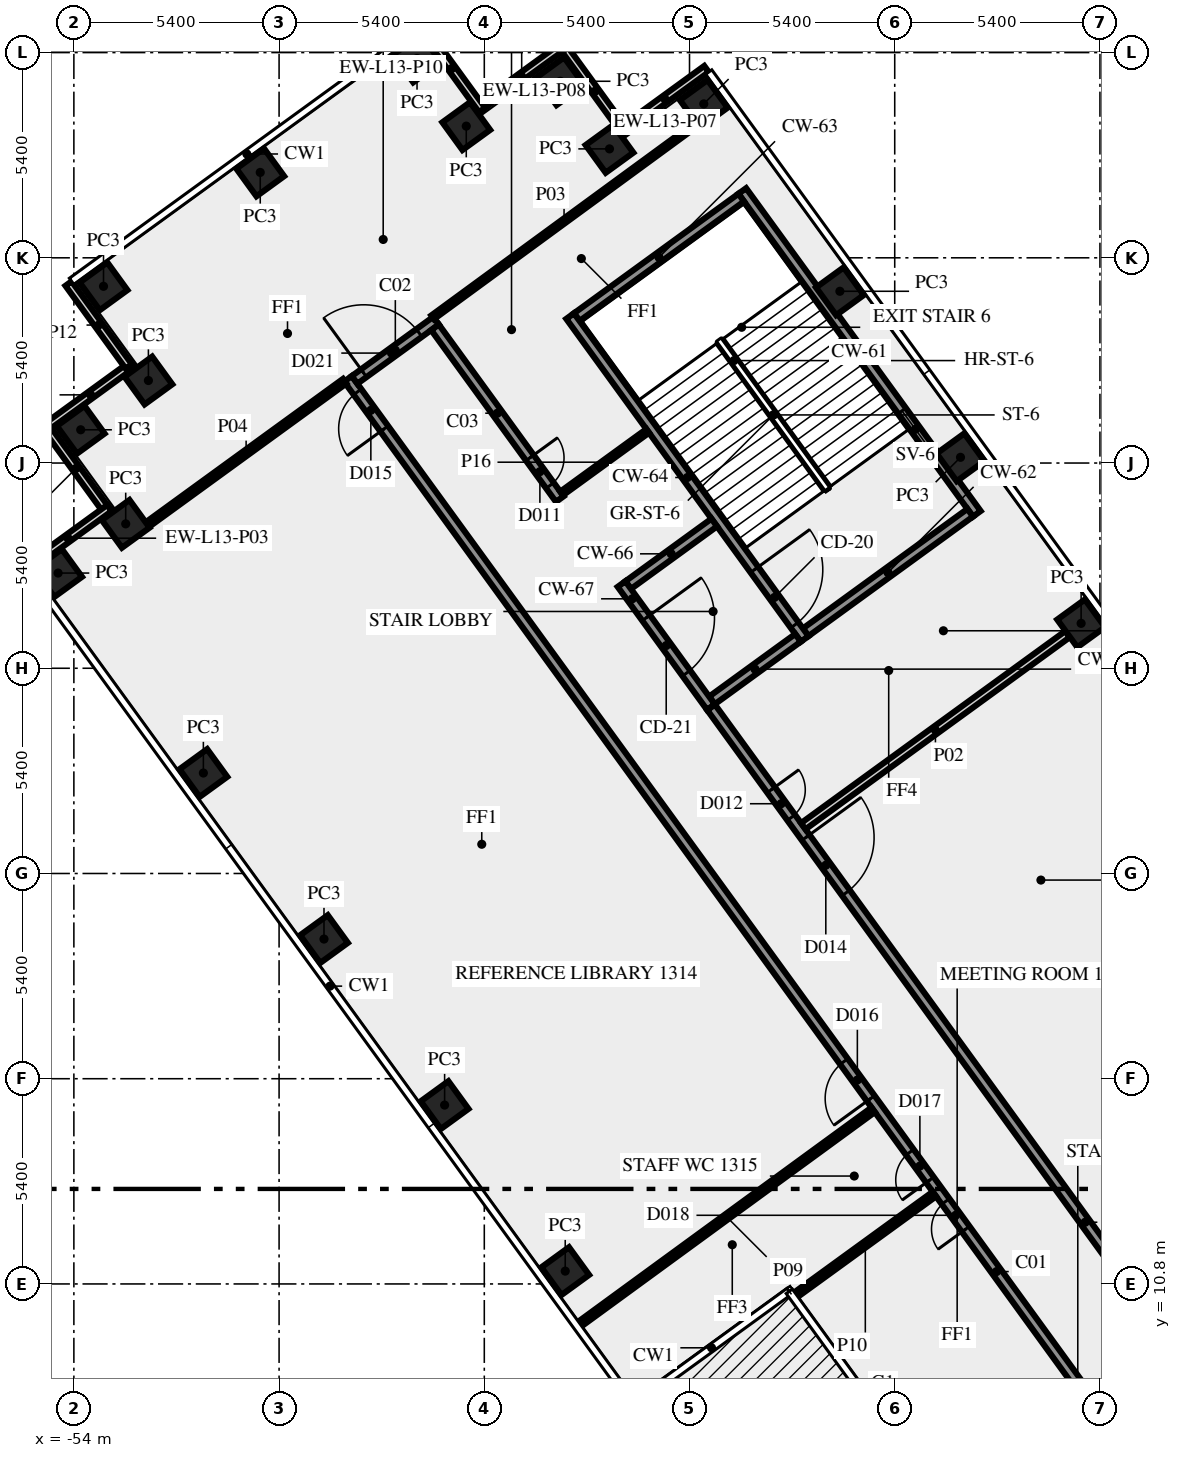
"""IFC4 building model, lengths in metres.
Left out: names, types, materials, properties, quantities, classifications, styles, units other than length and angle.
Written with IfcOpenShell. Run it as: python <this file> out.ifc"""

import sys

from ifc_helpers import new_model, si_unit, direction, frame, frame_2d, origin, origin_2d, place, context, subcontext, project, spatial, rectangle, extrude, element, fill, save


model = new_model("IFC4")
c1 = context("Model", 3, precision=1e-05, world=origin(), true_north=direction((0.0, 1.0)))
c2 = subcontext(c1, "Body", "Model", "MODEL_VIEW")
j1 = project(units=[si_unit("LENGTHUNIT", "METRE"), si_unit("PLANEANGLEUNIT", "RADIAN")], contexts=[c1])
p1 = place(None, origin())
s1 = spatial("IfcSite", under=j1, at=p1, CompositionType="ELEMENT")
p2 = place(p1, origin())
s2 = spatial("IfcBuilding", under=s1, at=p2, CompositionType="ELEMENT")
p3 = place(p2, frame((0.0, 0.0, 59.0)))
s3 = spatial("IfcBuildingStorey", under=s2, at=p3, CompositionType="ELEMENT", Elevation=59.0)
for number, where, z_axis, x_axis in (
    (1, (-27.495, 28.181, 0.0), (0.0, 0.0, 1.0), (-0.588, 0.809, 0.0)),
    (2, (-30.669, 32.55, 0.0), (0.0, 0.0, 1.0), (-0.588, 0.809, 0.0)),
    (3, (-33.843, 36.919, 0.0), (0.0, 0.0, 1.0), (-0.588, 0.809, 0.0)),
    (4, (-37.425, 41.85, 0.0), (0.0, 0.0, 1.0), (-0.588, 0.809, 0.0)),
    (5, (-39.906, 40.666, 0.0), (0.0, 0.0, 1.0), (-0.588, 0.809, 0.0)),
    (6, (-41.2, 42.445, 0.0), (0.0, 0.0, 1.0), (-0.588, 0.809, 0.0)),
    (7, (-43.675, 41.265, 0.0), (0.0, 0.0, 1.0), (-0.809, -0.588, 0.0)),
    (8, (-44.97, 43.045, 0.0), (0.0, 0.0, 1.0), (-0.809, -0.588, 0.0)),
    (9, (-49.096, 40.047, 0.0), (0.0, 0.0, 1.0), (-0.809, -0.588, 0.0)),
    (10, (-53.22, 37.05, 0.0), (0.0, 0.0, 1.0), (0.588, -0.809, 0.0)),
    (11, (-52.039, 34.571, 0.0), (0.0, 0.0, 1.0), (-0.809, -0.588, 0.0)),
    (12, (-53.82, 33.275, 0.0), (0.0, 0.0, 1.0), (0.588, -0.809, 0.0)),
    (13, (-52.636, 30.8, 0.0), (0.0, 0.0, 1.0), (-0.809, -0.588, 0.0)),
    (14, (-54.415, 29.505, 0.0), (0.0, 0.0, 1.0), (0.588, -0.809, 0.0)),
    (15, (-50.592, 24.243, 0.0), (0.0, 0.0, 1.0), (0.588, -0.809, 0.0)),
    (16, (-47.418, 19.875, 0.0), (0.0, 0.0, 1.0), (0.588, -0.809, 0.0)),
    (17, (-44.244, 15.506, 0.0), (0.0, 0.0, 1.0), (0.588, -0.809, 0.0)),
    (18, (-41.07, 11.137, 0.0), (0.0, 0.0, 1.0), (0.588, -0.809, 0.0)),
):
    element("IfcColumn", number, at=place(p3, frame(where, z_axis=z_axis, x_axis=x_axis)), inside=s3, PredefinedType="COLUMN", context=c2, shape_type="SweptSolid", body=[
        extrude(rectangle(XDim=0.9, YDim=0.9, at=origin_2d()), origin(), (0.0, 0.0, 1.0), 3.65),
    ])
p4 = place(p3, frame((-52.465, 34.987, 0.0), z_axis=(0.0, 0.0, 1.0), x_axis=(-0.809033161865, -0.587762999008, 0.0)))
e19 = element("IfcWall", 19, at=p4, inside=s3, PredefinedType="SOLIDWALL", context=c2, shape_type="SweptSolid", body=[
    extrude(rectangle(XDim=2.7, YDim=0.2, at=frame_2d((1.35, 0.0))), origin(), (0.0, 0.0, 1.0), 3.65),
])
p5 = place(p3, frame((-54.738, 33.351, 0.0), z_axis=(0.0, 0.0, 1.0), x_axis=(0.587779184282, -0.809021403008, 0.0)))
e20 = element("IfcWall", 20, at=p5, inside=s3, PredefinedType="SOLIDWALL", context=c2, shape_type="SweptSolid", body=[
    extrude(rectangle(XDim=2.7, YDim=0.2, at=frame_2d((1.35, 0.0))), origin(), (0.0, 0.0, 1.0), 3.65),
])
for number, where, z_axis, x_axis in (
    (21, (-53.063, 31.216, 0.0), (0.0, 0.0, 1.0), (-0.809, -0.588, 0.0)),
    (22, (-37.353, 42.768, 0.0), (0.0, 0.0, 1.0), (-0.809, -0.588, 0.0)),
):
    element("IfcWall", number, at=place(p3, frame(where, z_axis=z_axis, x_axis=x_axis)), inside=s3, PredefinedType="SOLIDWALL", context=c2, shape_type="SweptSolid", body=[
        extrude(rectangle(XDim=2.7, YDim=0.2, at=frame_2d((1.35, 0.0))), origin(), (0.0, 0.0, 1.0), 3.65),
    ])
p6 = place(p3, frame((-39.488, 41.094, 0.0), z_axis=(0.0, 0.0, 1.0), x_axis=(-0.587806000234, 0.809001919707, 0.0)))
e23 = element("IfcWall", 23, at=p6, inside=s3, PredefinedType="SOLIDWALL", context=c2, shape_type="SweptSolid", body=[
    extrude(rectangle(XDim=2.7, YDim=0.2, at=frame_2d((1.35, 0.0))), origin(), (0.0, 0.0, 1.0), 3.65),
])
for number, where, z_axis, x_axis in (
    (24, (-41.124, 43.366, 0.0), (0.0, 0.0, 1.0), (-0.809, -0.588, 0.0)),
    (25, (-43.259, 41.691, 0.0), (0.0, 0.0, 1.0), (-0.588, 0.809, 0.0)),
    (26, (-54.14, 37.123, 0.0), (0.0, 0.0, 1.0), (0.588, -0.809, 0.0)),
):
    element("IfcWall", number, at=place(p3, frame(where, z_axis=z_axis, x_axis=x_axis)), inside=s3, PredefinedType="SOLIDWALL", context=c2, shape_type="SweptSolid", body=[
        extrude(rectangle(XDim=2.7, YDim=0.2, at=frame_2d((1.35, 0.0))), origin(), (0.0, 0.0, 1.0), 3.65),
    ])
p7 = place(p3, frame((-30.24, 31.064, 0.0), z_axis=(0.0, 0.0, 1.0), x_axis=(-0.587795589702, 0.809009483706, 0.0)))
e27 = element("IfcWall", 27, at=p7, inside=s3, PredefinedType="SHEAR", context=c2, shape_type="SweptSolid", body=[
    extrude(rectangle(XDim=10.5, YDim=0.25, at=frame_2d((5.25, 0.0))), origin(), (0.0, 0.0, 1.0), 3.65),
])
p8 = place(p7, frame((2.15, 0.0, 1.0)))
e28 = element("IfcOpeningElement", 28, at=p8, cuts=e27, PredefinedType="OPENING", context=c2, shape_type="SweptSolid", body=[
    extrude(rectangle(XDim=1.2, YDim=1.2, at=frame_2d((0.6, 0.6))), frame((0.0, 0.135, 0.0), z_axis=(0.0, -1.0, 0.0), x_axis=(1.0, 0.0, 0.0)), (0.0, 0.0, 1.0), 0.27),
])
p9 = place(p3, frame((-30.414, 31.092, 0.0), z_axis=(0.0, 0.0, 1.0), x_axis=(-0.8089984606, -0.587810760999, 0.0)))
e29 = element("IfcWall", 29, at=p9, inside=s3, PredefinedType="SHEAR", context=c2, shape_type="SweptSolid", body=[
    extrude(rectangle(XDim=5.35, YDim=0.25, at=frame_2d((2.675, 0.0))), origin(), (0.0, 0.0, 1.0), 3.65),
])
p10 = place(p3, frame((-36.439, 39.384, 0.0), z_axis=(0.0, 0.0, 1.0), x_axis=(-0.809020161303, -0.587780893365, 0.0)))
e30 = element("IfcWall", 30, at=p10, inside=s3, PredefinedType="SHEAR", context=c2, shape_type="SweptSolid", body=[
    extrude(rectangle(XDim=5.35, YDim=0.25, at=frame_2d((2.675, 0.0))), origin(), (0.0, 0.0, 1.0), 3.65),
])
p11 = place(p3, frame((-40.942, 36.267, 0.0), z_axis=(0.0, 0.0, 1.0), x_axis=(0.587795589702, -0.809009483706, 0.0)))
e31 = element("IfcWall", 31, at=p11, inside=s3, PredefinedType="SHEAR", context=c2, shape_type="SweptSolid", body=[
    extrude(rectangle(XDim=10.5, YDim=0.25, at=frame_2d((5.25, 0.0))), origin(), (0.0, 0.0, 1.0), 3.65),
])
p12 = place(p11, frame((8.25, 0.0, 0.0)))
e32 = element("IfcOpeningElement", 32, at=p12, cuts=e31, PredefinedType="OPENING", context=c2, shape_type="SweptSolid", body=[
    extrude(rectangle(XDim=1.8, YDim=2.1, at=frame_2d((0.9, 1.05))), frame((0.0, 0.135, 0.0), z_axis=(0.0, -1.0, 0.0), x_axis=(1.0, 0.0, 0.0)), (0.0, 0.0, 1.0), 0.27),
])
for number, where, z_axis, x_axis in (
    (33, (-34.945, 27.8, 0.0), (0.0, 0.0, 1.0), (-0.809, -0.588, 0.0)),
    (34, (-37.149, 30.834, 0.0), (0.0, 0.0, 1.0), (-0.809, -0.588, 0.0)),
):
    element("IfcWall", number, at=place(p3, frame(where, z_axis=z_axis, x_axis=x_axis)), inside=s3, PredefinedType="SHEAR", context=c2, shape_type="SweptSolid", body=[
        extrude(rectangle(XDim=2.8, YDim=0.25, at=frame_2d((1.4, 0.0))), origin(), (0.0, 0.0, 1.0), 3.65),
    ])
p13 = place(p3, frame((-39.589, 29.216, 0.0), z_axis=(0.0, 0.0, 1.0), x_axis=(0.587772420479, -0.809026317077, 0.0)))
e35 = element("IfcWall", 35, at=p13, inside=s3, PredefinedType="SHEAR", context=c2, shape_type="SweptSolid", body=[
    extrude(rectangle(XDim=4.0, YDim=0.25, at=frame_2d((2.0, 0.0))), origin(), (0.0, 0.0, 1.0), 3.65),
])
p14 = place(p13, frame((1.1, 0.0, 0.0)))
e36 = element("IfcOpeningElement", 36, at=p14, cuts=e35, PredefinedType="OPENING", context=c2, shape_type="SweptSolid", body=[
    extrude(rectangle(XDim=1.8, YDim=2.1, at=frame_2d((0.9, 1.05))), frame((0.0, 0.135, 0.0), z_axis=(0.0, -1.0, 0.0), x_axis=(1.0, 0.0, 0.0)), (0.0, 0.0, 1.0), 0.27),
])
p15 = place(p3, frame((-20.531, -1.523, 0.0), z_axis=(0.0, 0.0, 1.0), x_axis=(-0.587784593204, 0.809017473231, 0.0)))
e37 = element("IfcWall", 37, at=p15, inside=s3, PredefinedType="SOLIDWALL", context=c2, shape_type="SweptSolid", body=[
    extrude(rectangle(XDim=44.67, YDim=0.25, at=frame_2d((22.335, 0.0))), origin(), (0.0, 0.0, 1.0), 3.65),
])
p16 = place(p15, frame((43.046, 0.0, 0.0)))
e38 = element("IfcOpeningElement", 38, at=p16, cuts=e37, PredefinedType="OPENING", context=c2, shape_type="SweptSolid", body=[
    extrude(rectangle(XDim=1.2, YDim=2.1, at=frame_2d((0.6, 1.05))), frame((0.0, 0.135, 0.0), z_axis=(0.0, -1.0, 0.0), x_axis=(1.0, 0.0, 0.0)), (0.0, 0.0, 1.0), 0.27),
])
p17 = place(p15, frame((21.266, 0.0, 0.0)))
e39 = element("IfcOpeningElement", 39, at=p17, cuts=e37, PredefinedType="OPENING", context=c2, shape_type="SweptSolid", body=[
    extrude(rectangle(XDim=1.2, YDim=2.1, at=frame_2d((0.6, 1.05))), frame((0.0, 0.135, 0.0), z_axis=(0.0, -1.0, 0.0), x_axis=(1.0, 0.0, 0.0)), (0.0, 0.0, 1.0), 0.27),
])
p18 = place(p15, frame((17.015, 0.0, 0.0)))
e40 = element("IfcOpeningElement", 40, at=p18, cuts=e37, PredefinedType="OPENING", context=c2, shape_type="SweptSolid", body=[
    extrude(rectangle(XDim=0.9, YDim=2.1, at=frame_2d((0.45, 1.05))), frame((0.0, 0.135, 0.0), z_axis=(0.0, -1.0, 0.0), x_axis=(1.0, 0.0, 0.0)), (0.0, 0.0, 1.0), 0.27),
])
p19 = place(p15, frame((0.533, 0.0, 0.0)))
e41 = element("IfcOpeningElement", 41, at=p19, cuts=e37, PredefinedType="OPENING", context=c2, shape_type="SweptSolid", body=[
    extrude(rectangle(XDim=0.9, YDim=2.1, at=frame_2d((0.45, 1.05))), frame((0.0, 0.135, 0.0), z_axis=(0.0, -1.0, 0.0), x_axis=(1.0, 0.0, 0.0)), (0.0, 0.0, 1.0), 0.27),
])
p20 = place(p15, frame((18.616, 0.0, 0.0)))
e42 = element("IfcOpeningElement", 42, at=p20, cuts=e37, PredefinedType="OPENING", context=c2, shape_type="SweptSolid", body=[
    extrude(rectangle(XDim=0.9, YDim=2.1, at=frame_2d((0.45, 1.05))), frame((0.0, 0.135, 0.0), z_axis=(0.0, -1.0, 0.0), x_axis=(1.0, 0.0, 0.0)), (0.0, 0.0, 1.0), 0.27),
])
p21 = place(p15, frame((7.816, 0.0, 0.0)))
e43 = element("IfcOpeningElement", 43, at=p21, cuts=e37, PredefinedType="OPENING", context=c2, shape_type="SweptSolid", body=[
    extrude(rectangle(XDim=0.9, YDim=2.1, at=frame_2d((0.45, 1.05))), frame((0.0, 0.135, 0.0), z_axis=(0.0, -1.0, 0.0), x_axis=(1.0, 0.0, 0.0)), (0.0, 0.0, 1.0), 0.27),
])
p22 = place(p3, frame((-46.613, 34.588, 0.0), z_axis=(0.0, 0.0, 1.0), x_axis=(0.808994936898, 0.587815610607, 0.0)))
e44 = element("IfcWall", 44, at=p22, inside=s3, PredefinedType="SOLIDWALL", context=c2, shape_type="SweptSolid", body=[
    extrude(rectangle(XDim=2.65, YDim=0.25, at=frame_2d((1.325, 0.0))), origin(), (0.0, 0.0, 1.0), 3.65),
])
p23 = place(p22, frame((0.299, 0.0, 0.0)))
e45 = element("IfcOpeningElement", 45, at=p23, cuts=e44, PredefinedType="OPENING", context=c2, shape_type="SweptSolid", body=[
    extrude(rectangle(XDim=1.8, YDim=2.1, at=frame_2d((0.9, 1.05))), frame((0.0, 0.135, 0.0), z_axis=(0.0, -1.0, 0.0), x_axis=(1.0, 0.0, 0.0)), (0.0, 0.0, 1.0), 0.27),
])
p24 = place(p3, frame((-44.497, 35.971, 0.0), z_axis=(0.0, 0.0, 1.0), x_axis=(0.587742866856, -0.809047787501, 0.0)))
e46 = element("IfcWall", 46, at=p24, inside=s3, PredefinedType="SOLIDWALL", context=c2, shape_type="SweptSolid", body=[
    extrude(rectangle(XDim=5.586, YDim=0.25, at=frame_2d((2.793, 0.0))), origin(), (0.0, 0.0, 1.0), 3.65),
])
p25 = place(p24, frame((4.245, 0.0, 0.0)))
e47 = element("IfcOpeningElement", 47, at=p25, cuts=e46, PredefinedType="OPENING", context=c2, shape_type="SweptSolid", body=[
    extrude(rectangle(XDim=0.9, YDim=2.1, at=frame_2d((0.45, 1.05))), frame((0.0, 0.135, 0.0), z_axis=(0.0, -1.0, 0.0), x_axis=(1.0, 0.0, 0.0)), (0.0, 0.0, 1.0), 0.27),
])
p26 = place(p3, frame((-37.232, 25.972, 0.0), z_axis=(0.0, 0.0, 1.0), x_axis=(0.587786323093, -0.809016216391, 0.0)))
e48 = element("IfcWall", 48, at=p26, inside=s3, PredefinedType="SOLIDWALL", context=c2, shape_type="SweptSolid", body=[
    extrude(rectangle(XDim=33.493, YDim=0.25, at=frame_2d((16.747, 0.0))), origin(), (0.0, 0.0, 1.0), 3.65),
])
p27 = place(p26, frame((28.301, 0.0, 0.0)))
e49 = element("IfcOpeningElement", 49, at=p27, cuts=e48, PredefinedType="OPENING", context=c2, shape_type="SweptSolid", body=[
    extrude(rectangle(XDim=1.8, YDim=2.1, at=frame_2d((0.9, 1.05))), frame((0.0, 0.135, 0.0), z_axis=(0.0, -1.0, 0.0), x_axis=(1.0, 0.0, 0.0)), (0.0, 0.0, 1.0), 0.27),
])
p28 = place(p26, frame((4.235, 0.0, 0.0)))
e50 = element("IfcOpeningElement", 50, at=p28, cuts=e48, PredefinedType="OPENING", context=c2, shape_type="SweptSolid", body=[
    extrude(rectangle(XDim=1.8, YDim=2.1, at=frame_2d((0.9, 1.05))), frame((0.0, 0.135, 0.0), z_axis=(0.0, -1.0, 0.0), x_axis=(1.0, 0.0, 0.0)), (0.0, 0.0, 1.0), 0.27),
])
p29 = place(p26, frame((2.685, 0.0, 0.0)))
e51 = element("IfcOpeningElement", 51, at=p29, cuts=e48, PredefinedType="OPENING", context=c2, shape_type="SweptSolid", body=[
    extrude(rectangle(XDim=0.9, YDim=2.1, at=frame_2d((0.45, 1.05))), frame((0.0, 0.135, 0.0), z_axis=(0.0, -1.0, 0.0), x_axis=(1.0, 0.0, 0.0)), (0.0, 0.0, 1.0), 0.27),
])
p30 = place(p3, frame((-27.851, 27.897, 0.0), z_axis=(0.0, 0.0, 1.0), x_axis=(-0.809030728677, -0.587766348183, 0.0)))
e52 = element("IfcWall", 52, at=p30, inside=s3, PredefinedType="SOLIDWALL", context=c2, shape_type="SweptSolid", body=[
    extrude(rectangle(XDim=8.596, YDim=0.2, at=frame_2d((4.298, 0.0))), origin(), (0.0, 0.0, 1.0), 3.65),
])
p31 = place(p3, frame((-44.559, 36.235, 0.0), z_axis=(0.0, 0.0, 1.0), x_axis=(0.806949857155, 0.590619952286, 0.0)))
e53 = element("IfcWall", 53, at=p31, inside=s3, PredefinedType="PARTITIONING", context=c2, shape_type="SweptSolid", body=[
    extrude(rectangle(XDim=8.57, YDim=0.12, at=frame_2d((4.285, 0.0))), origin(), (0.0, 0.0, 1.0), 3.65),
])
p32 = place(p3, frame((-52.062, 30.783, 0.0), z_axis=(0.0, 0.0, 1.0), x_axis=(0.808992766665, 0.58781859743, 0.0)))
e54 = element("IfcWall", 54, at=p32, inside=s3, PredefinedType="PARTITIONING", context=c2, shape_type="SweptSolid", body=[
    extrude(rectangle(XDim=6.414, YDim=0.15, at=frame_2d((3.207, 0.0))), origin(), (0.0, 0.0, 1.0), 3.65),
])
p33 = place(p3, frame((-40.68, 9.75, 0.0), z_axis=(0.0, 0.0, 1.0), x_axis=(0.807645841498, 0.589667868135, 0.0)))
e55 = element("IfcWall", 55, at=p33, inside=s3, PredefinedType="PARTITIONING", context=c2, shape_type="SweptSolid", body=[
    extrude(rectangle(XDim=9.551, YDim=0.15, at=frame_2d((4.775, 0.0))), origin(), (0.0, 0.0, 1.0), 2.75),
])
p34 = place(p3, frame((-31.356, 13.164, 0.0), z_axis=(0.0, 0.0, 1.0), x_axis=(-0.80905553785, -0.587732198092, 0.0)))
e56 = element("IfcWall", 56, at=p34, inside=s3, PredefinedType="PARTITIONING", context=c2, shape_type="SweptSolid", body=[
    extrude(rectangle(XDim=4.493, YDim=0.15, at=frame_2d((2.247, 0.0))), origin(), (0.0, 0.0, 1.0), 3.65),
])
p35 = place(p3, frame((-41.166, 31.599, 0.0), z_axis=(0.0, 0.0, 1.0), x_axis=(0.809090262332, 0.587684394381, 0.0)))
e57 = element("IfcWall", 57, at=p35, inside=s3, PredefinedType="PARTITIONING", context=c2, shape_type="SweptSolid", body=[
    extrude(rectangle(XDim=2.801, YDim=0.12, at=frame_2d((1.4, 0.0))), origin(), (0.0, 0.0, 1.0), 3.65),
])
p36 = place(p8, origin())
e58 = element("IfcWindow", 58, at=p36, inside=s3, PartitioningType="SINGLE_PANEL", PredefinedType="WINDOW", context=c2, shape_type="SweptSolid", body=[
    extrude(rectangle(XDim=1.2, YDim=1.2, at=frame_2d((0.6, 0.6))), frame((0.0, 0.03, 0.0), z_axis=(0.0, -1.0, 0.0), x_axis=(1.0, 0.0, 0.0)), (0.0, 0.0, 1.0), 0.06),
])
fill(e28, e58)
p37 = place(p12, origin())
e59 = element("IfcDoor", 59, at=p37, inside=s3, OperationType="DOUBLE_DOOR_SINGLE_SWING", PredefinedType="DOOR", context=c2, shape_type="SweptSolid", body=[
    extrude(rectangle(XDim=1.8, YDim=2.1, at=frame_2d((0.9, 1.05))), frame((0.0, 0.025, 0.0), z_axis=(0.0, -1.0, 0.0), x_axis=(1.0, 0.0, 0.0)), (0.0, 0.0, 1.0), 0.05),
])
fill(e32, e59)
p38 = place(p14, origin())
e60 = element("IfcDoor", 60, at=p38, inside=s3, OperationType="DOUBLE_DOOR_SINGLE_SWING", PredefinedType="DOOR", context=c2, shape_type="SweptSolid", body=[
    extrude(rectangle(XDim=1.8, YDim=2.1, at=frame_2d((0.9, 1.05))), frame((0.0, 0.025, 0.0), z_axis=(0.0, -1.0, 0.0), x_axis=(1.0, 0.0, 0.0)), (0.0, 0.0, 1.0), 0.05),
])
fill(e36, e60)
p39 = place(p28, origin())
e61 = element("IfcDoor", 61, at=p39, inside=s3, OperationType="DOUBLE_DOOR_SINGLE_SWING", PredefinedType="DOOR", context=c2, shape_type="SweptSolid", body=[
    extrude(rectangle(XDim=1.8, YDim=2.1, at=frame_2d((0.9, 1.05))), frame((0.0, 0.025, 0.0), z_axis=(0.0, -1.0, 0.0), x_axis=(1.0, 0.0, 0.0)), (0.0, 0.0, 1.0), 0.05),
])
fill(e50, e61)
p40 = place(p23, origin())
e62 = element("IfcDoor", 62, at=p40, inside=s3, OperationType="DOUBLE_DOOR_SINGLE_SWING", PredefinedType="DOOR", context=c2, shape_type="SweptSolid", body=[
    extrude(rectangle(XDim=1.8, YDim=2.1, at=frame_2d((0.9, 1.05))), frame((0.0, 0.025, 0.0), z_axis=(0.0, -1.0, 0.0), x_axis=(1.0, 0.0, 0.0)), (0.0, 0.0, 1.0), 0.05),
])
fill(e45, e62)
p41 = place(p25, origin())
e63 = element("IfcDoor", 63, at=p41, inside=s3, OperationType="SINGLE_SWING_RIGHT", PredefinedType="DOOR", context=c2, shape_type="SweptSolid", body=[
    extrude(rectangle(XDim=0.9, YDim=2.1, at=frame_2d((0.45, 1.05))), frame((0.0, 0.025, 0.0), z_axis=(0.0, -1.0, 0.0), x_axis=(1.0, 0.0, 0.0)), (0.0, 0.0, 1.0), 0.05),
])
fill(e47, e63)
p42 = place(p16, origin())
e64 = element("IfcDoor", 64, at=p42, inside=s3, OperationType="SINGLE_SWING_RIGHT", PredefinedType="DOOR", context=c2, shape_type="SweptSolid", body=[
    extrude(rectangle(XDim=1.2, YDim=2.1, at=frame_2d((0.6, 1.05))), frame((0.0, 0.025, 0.0), z_axis=(0.0, -1.0, 0.0), x_axis=(1.0, 0.0, 0.0)), (0.0, 0.0, 1.0), 0.05),
])
fill(e38, e64)
p43 = place(p17, origin())
e65 = element("IfcDoor", 65, at=p43, inside=s3, OperationType="SINGLE_SWING_LEFT", PredefinedType="DOOR", context=c2, shape_type="SweptSolid", body=[
    extrude(rectangle(XDim=1.2, YDim=2.1, at=frame_2d((0.6, 1.05))), frame((0.0, 0.025, 0.0), z_axis=(0.0, -1.0, 0.0), x_axis=(1.0, 0.0, 0.0)), (0.0, 0.0, 1.0), 0.05),
])
fill(e39, e65)
p44 = place(p18, origin())
e66 = element("IfcDoor", 66, at=p44, inside=s3, OperationType="SINGLE_SWING_RIGHT", PredefinedType="DOOR", context=c2, shape_type="SweptSolid", body=[
    extrude(rectangle(XDim=0.9, YDim=2.1, at=frame_2d((0.45, 1.05))), frame((0.0, 0.025, 0.0), z_axis=(0.0, -1.0, 0.0), x_axis=(1.0, 0.0, 0.0)), (0.0, 0.0, 1.0), 0.05),
])
fill(e40, e66)
p45 = place(p29, origin())
e67 = element("IfcDoor", 67, at=p45, inside=s3, OperationType="SINGLE_SWING_RIGHT", PredefinedType="DOOR", context=c2, shape_type="SweptSolid", body=[
    extrude(rectangle(XDim=0.9, YDim=2.1, at=frame_2d((0.45, 1.05))), frame((0.0, 0.025, 0.0), z_axis=(0.0, -1.0, 0.0), x_axis=(1.0, 0.0, 0.0)), (0.0, 0.0, 1.0), 0.05),
])
fill(e51, e67)
p46 = place(p20, origin())
e68 = element("IfcDoor", 68, at=p46, inside=s3, OperationType="SINGLE_SWING_LEFT", PredefinedType="DOOR", context=c2, shape_type="SweptSolid", body=[
    extrude(rectangle(XDim=0.9, YDim=2.1, at=frame_2d((0.45, 1.05))), frame((0.0, 0.025, 0.0), z_axis=(0.0, -1.0, 0.0), x_axis=(1.0, 0.0, 0.0)), (0.0, 0.0, 1.0), 0.05),
])
fill(e42, e68)
save(model, sys.argv[1])
